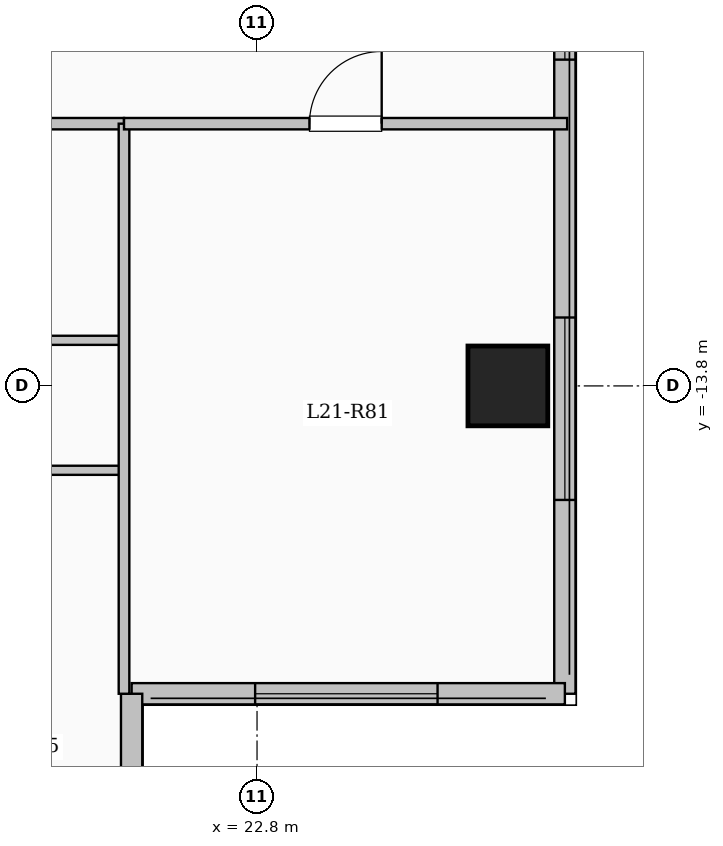
"""IFC4 building model, lengths in metres.
Left out: names, types, materials, properties, quantities, classifications, styles, units other than length and angle.
Written with IfcOpenShell. Run it as: python <this file> out.ifc"""

import sys

from ifc_helpers import new_model, si_unit, direction, frame, frame_2d, origin, origin_2d, place, context, subcontext, project, spatial, rectangle, extrude, element, fill, save


model = new_model("IFC4")
c1 = context("Model", 3, precision=1e-05, world=origin(), true_north=direction((0.0, 1.0)))
c2 = subcontext(c1, "Body", "Model", "MODEL_VIEW")
j1 = project(units=[si_unit("LENGTHUNIT", "METRE"), si_unit("PLANEANGLEUNIT", "RADIAN")], contexts=[c1])
p1 = place(None, origin())
s1 = spatial("IfcSite", under=j1, at=p1, CompositionType="ELEMENT")
p2 = place(p1, origin())
s2 = spatial("IfcBuilding", under=s1, at=p2, CompositionType="ELEMENT")
p3 = place(p2, frame((0.0, 0.0, 81.65)))
s3 = spatial("IfcBuildingStorey", under=s2, at=p3, CompositionType="ELEMENT", Elevation=81.65)
p4 = place(p3, frame((26.1, -13.8, 0.0), z_axis=(0.0, 0.0, 1.0), x_axis=(1.0, 0.0, 0.0)))
e1 = element("IfcColumn", 1, at=p4, inside=s3, PredefinedType="COLUMN", context=c2, shape_type="SweptSolid", body=[
    extrude(rectangle(XDim=1.05, YDim=1.05, at=origin_2d()), origin(), (0.0, 0.0, 1.0), 3.35),
])
p5 = place(p3, frame((26.85, 17.85, 0.0), z_axis=(0.0, 0.0, 1.0), x_axis=(0.0, -1.0, 0.0)))
e2 = element("IfcWall", 2, at=p5, inside=s3, PredefinedType="SOLIDWALL", context=c2, shape_type="SweptSolid", body=[
    extrude(rectangle(XDim=35.7, YDim=0.28, at=frame_2d((17.85, 0.0))), origin(), (0.0, 0.0, 1.0), 3.1),
])
p6 = place(p5, frame((1.675, 0.0, 0.9)))
e3 = element("IfcOpeningElement", 3, at=p6, cuts=e2, PredefinedType="OPENING", context=c2, shape_type="SweptSolid", body=[
    extrude(rectangle(XDim=2.0, YDim=1.7, at=frame_2d((1.0, 0.85))), frame((0.0, 0.15, 0.0), z_axis=(0.0, -1.0, 0.0), x_axis=(1.0, 0.0, 0.0)), (0.0, 0.0, 1.0), 0.3),
])
p7 = place(p5, frame((5.725, 0.0, 0.95)))
e4 = element("IfcOpeningElement", 4, at=p7, cuts=e2, PredefinedType="OPENING", context=c2, shape_type="SweptSolid", body=[
    extrude(rectangle(XDim=1.0, YDim=1.5, at=frame_2d((0.5, 0.75))), frame((0.0, 0.15, 0.0), z_axis=(0.0, -1.0, 0.0), x_axis=(1.0, 0.0, 0.0)), (0.0, 0.0, 1.0), 0.3),
])
p8 = place(p5, frame((8.975, 0.0, 0.9)))
e5 = element("IfcOpeningElement", 5, at=p8, cuts=e2, PredefinedType="OPENING", context=c2, shape_type="SweptSolid", body=[
    extrude(rectangle(XDim=2.0, YDim=1.7, at=frame_2d((1.0, 0.85))), frame((0.0, 0.15, 0.0), z_axis=(0.0, -1.0, 0.0), x_axis=(1.0, 0.0, 0.0)), (0.0, 0.0, 1.0), 0.3),
])
p9 = place(p5, frame((13.725, 0.0, 0.9)))
e6 = element("IfcOpeningElement", 6, at=p9, cuts=e2, PredefinedType="OPENING", context=c2, shape_type="SweptSolid", body=[
    extrude(rectangle(XDim=1.8, YDim=1.65, at=frame_2d((0.9, 0.825))), frame((0.0, 0.15, 0.0), z_axis=(0.0, -1.0, 0.0), x_axis=(1.0, 0.0, 0.0)), (0.0, 0.0, 1.0), 0.3),
])
p10 = place(p5, frame((19.55, 0.0, 0.9)))
e7 = element("IfcOpeningElement", 7, at=p10, cuts=e2, PredefinedType="OPENING", context=c2, shape_type="SweptSolid", body=[
    extrude(rectangle(XDim=2.4, YDim=1.8, at=frame_2d((1.2, 0.9))), frame((0.0, 0.15, 0.0), z_axis=(0.0, -1.0, 0.0), x_axis=(1.0, 0.0, 0.0)), (0.0, 0.0, 1.0), 0.3),
])
p11 = place(p5, frame((25.857, 0.0, 0.9)))
e8 = element("IfcOpeningElement", 8, at=p11, cuts=e2, PredefinedType="OPENING", context=c2, shape_type="SweptSolid", body=[
    extrude(rectangle(XDim=1.5, YDim=1.65, at=frame_2d((0.75, 0.825))), frame((0.0, 0.15, 0.0), z_axis=(0.0, -1.0, 0.0), x_axis=(1.0, 0.0, 0.0)), (0.0, 0.0, 1.0), 0.3),
])
p12 = place(p5, frame((30.75, 0.0, 0.9)))
e9 = element("IfcOpeningElement", 9, at=p12, cuts=e2, PredefinedType="OPENING", context=c2, shape_type="SweptSolid", body=[
    extrude(rectangle(XDim=2.4, YDim=1.8, at=frame_2d((1.2, 0.9))), frame((0.0, 0.15, 0.0), z_axis=(0.0, -1.0, 0.0), x_axis=(1.0, 0.0, 0.0)), (0.0, 0.0, 1.0), 0.3),
])
p13 = place(p3, frame((26.85, -17.85, 0.0), z_axis=(0.0, 0.0, 1.0), x_axis=(-1.0, 0.0, 0.0)))
e10 = element("IfcWall", 10, at=p13, inside=s3, PredefinedType="SOLIDWALL", context=c2, shape_type="SweptSolid", body=[
    extrude(rectangle(XDim=5.7, YDim=0.28, at=frame_2d((2.85, 0.0))), origin(), (0.0, 0.0, 1.0), 3.1),
])
p14 = place(p13, frame((1.675, 0.0, 0.9)))
e11 = element("IfcOpeningElement", 11, at=p14, cuts=e10, PredefinedType="OPENING", context=c2, shape_type="SweptSolid", body=[
    extrude(rectangle(XDim=2.4, YDim=1.8, at=frame_2d((1.2, 0.9))), frame((0.0, 0.15, 0.0), z_axis=(0.0, -1.0, 0.0), x_axis=(1.0, 0.0, 0.0)), (0.0, 0.0, 1.0), 0.3),
])
p15 = place(p3, frame((21.15, -17.85, 0.0), z_axis=(0.0, 0.0, 1.0), x_axis=(0.0, -1.0, 0.0)))
e12 = element("IfcWall", 12, at=p15, inside=s3, PredefinedType="SOLIDWALL", context=c2, shape_type="SweptSolid", body=[
    extrude(rectangle(XDim=4.2, YDim=0.28, at=frame_2d((2.1, 0.0))), origin(), (0.0, 0.0, 1.0), 3.1),
])
p16 = place(p15, frame((1.182, 0.0, 0.9)))
e13 = element("IfcOpeningElement", 13, at=p16, cuts=e12, PredefinedType="OPENING", context=c2, shape_type="SweptSolid", body=[
    extrude(rectangle(XDim=1.8, YDim=1.65, at=frame_2d((0.9, 0.825))), frame((0.0, 0.15, 0.0), z_axis=(0.0, -1.0, 0.0), x_axis=(1.0, 0.0, 0.0)), (0.0, 0.0, 1.0), 0.3),
])
p17 = place(p3, frame((8.55, -10.35, 0.0), z_axis=(0.0, 0.0, 1.0), x_axis=(1.0, 0.0, 0.0)))
e14 = element("IfcWall", 14, at=p17, inside=s3, PredefinedType="PARTITIONING", context=c2, shape_type="SweptSolid", body=[
    extrude(rectangle(XDim=12.5, YDim=0.15, at=frame_2d((6.25, 0.0))), origin(), (0.0, 0.0, 1.0), 3.1),
])
p18 = place(p17, frame((0.75, 0.0, 0.0)))
e15 = element("IfcOpeningElement", 15, at=p18, cuts=e14, PredefinedType="OPENING", context=c2, shape_type="SweptSolid", body=[
    extrude(rectangle(XDim=0.96, YDim=2.15, at=frame_2d((0.48, 1.075))), frame((0.0, 0.085, 0.0), z_axis=(0.0, -1.0, 0.0), x_axis=(1.0, 0.0, 0.0)), (0.0, 0.0, 1.0), 0.17),
])
p19 = place(p3, frame((17.165, -13.2, 0.0), z_axis=(0.0, 0.0, 1.0), x_axis=(1.0, 0.0, 0.0)))
e16 = element("IfcWall", 16, at=p19, inside=s3, PredefinedType="PARTITIONING", context=c2, shape_type="SweptSolid", body=[
    extrude(rectangle(XDim=3.885, YDim=0.12, at=frame_2d((1.942, 0.0))), origin(), (0.0, 0.0, 1.0), 3.1),
])
p20 = place(p19, frame((1.503, 0.0, 0.0)))
e17 = element("IfcOpeningElement", 17, at=p20, cuts=e16, PredefinedType="OPENING", context=c2, shape_type="SweptSolid", body=[
    extrude(rectangle(XDim=0.88, YDim=2.1, at=frame_2d((0.44, 1.05))), frame((0.0, 0.07, 0.0), z_axis=(0.0, -1.0, 0.0), x_axis=(1.0, 0.0, 0.0)), (0.0, 0.0, 1.0), 0.14),
])
p21 = place(p3, frame((12.792, -14.91, 0.0), z_axis=(0.0, 0.0, 1.0), x_axis=(1.0, 0.0, 0.0)))
e18 = element("IfcWall", 18, at=p21, inside=s3, PredefinedType="PARTITIONING", context=c2, shape_type="SweptSolid", body=[
    extrude(rectangle(XDim=8.318, YDim=0.12, at=frame_2d((4.159, 0.0))), origin(), (0.0, 0.0, 1.0), 3.1),
])
p22 = place(p21, frame((0.916, 0.0, 0.0)))
e19 = element("IfcOpeningElement", 19, at=p22, cuts=e18, PredefinedType="OPENING", context=c2, shape_type="SweptSolid", body=[
    extrude(rectangle(XDim=0.88, YDim=2.1, at=frame_2d((0.44, 1.05))), frame((0.0, 0.07, 0.0), z_axis=(0.0, -1.0, 0.0), x_axis=(1.0, 0.0, 0.0)), (0.0, 0.0, 1.0), 0.14),
])
p23 = place(p21, frame((3.629, 0.0, 0.0)))
e20 = element("IfcOpeningElement", 20, at=p23, cuts=e18, PredefinedType="OPENING", context=c2, shape_type="SweptSolid", body=[
    extrude(rectangle(XDim=0.88, YDim=2.1, at=frame_2d((0.44, 1.05))), frame((0.0, 0.07, 0.0), z_axis=(0.0, -1.0, 0.0), x_axis=(1.0, 0.0, 0.0)), (0.0, 0.0, 1.0), 0.14),
])
p24 = place(p21, frame((6.342, 0.0, 0.0)))
e21 = element("IfcOpeningElement", 21, at=p24, cuts=e18, PredefinedType="OPENING", context=c2, shape_type="SweptSolid", body=[
    extrude(rectangle(XDim=0.88, YDim=2.1, at=frame_2d((0.44, 1.05))), frame((0.0, 0.07, 0.0), z_axis=(0.0, -1.0, 0.0), x_axis=(1.0, 0.0, 0.0)), (0.0, 0.0, 1.0), 0.14),
])
p25 = place(p3, frame((21.05, -17.85, 0.0), z_axis=(0.0, 0.0, 1.0), x_axis=(0.0, 1.0, 0.0)))
e22 = element("IfcWall", 22, at=p25, inside=s3, PredefinedType="PARTITIONING", context=c2, shape_type="SweptSolid", body=[
    extrude(rectangle(XDim=7.5, YDim=0.14, at=frame_2d((3.75, 0.0))), origin(), (0.0, 0.0, 1.0), 3.1),
])
p26 = place(p3, frame((21.05, -10.35, 0.0), z_axis=(0.0, 0.0, 1.0), x_axis=(1.0, 0.0, 0.0)))
e23 = element("IfcWall", 23, at=p26, inside=s3, PredefinedType="PARTITIONING", context=c2, shape_type="SweptSolid", body=[
    extrude(rectangle(XDim=5.83, YDim=0.15, at=frame_2d((2.915, 0.0))), origin(), (0.0, 0.0, 1.0), 3.1),
])
p27 = place(p26, frame((2.44, 0.0, 0.0)))
e24 = element("IfcOpeningElement", 24, at=p27, cuts=e23, PredefinedType="OPENING", context=c2, shape_type="SweptSolid", body=[
    extrude(rectangle(XDim=0.95, YDim=2.15, at=frame_2d((0.475, 1.075))), frame((0.0, 0.085, 0.0), z_axis=(0.0, -1.0, 0.0), x_axis=(1.0, 0.0, 0.0)), (0.0, 0.0, 1.0), 0.17),
])
p28 = place(p11, origin())
e25 = element("IfcWindow", 25, at=p28, inside=s3, PartitioningType="SINGLE_PANEL", PredefinedType="WINDOW", context=c2, shape_type="SweptSolid", body=[
    extrude(rectangle(XDim=1.5, YDim=1.65, at=frame_2d((0.75, 0.825))), frame((0.0, 0.03, 0.0), z_axis=(0.0, -1.0, 0.0), x_axis=(1.0, 0.0, 0.0)), (0.0, 0.0, 1.0), 0.06),
])
fill(e8, e25)
p29 = place(p12, origin())
e26 = element("IfcWindow", 26, at=p29, inside=s3, PartitioningType="SINGLE_PANEL", PredefinedType="WINDOW", context=c2, shape_type="SweptSolid", body=[
    extrude(rectangle(XDim=2.4, YDim=1.8, at=frame_2d((1.2, 0.9))), frame((0.0, 0.03, 0.0), z_axis=(0.0, -1.0, 0.0), x_axis=(1.0, 0.0, 0.0)), (0.0, 0.0, 1.0), 0.06),
])
fill(e9, e26)
p30 = place(p14, origin())
e27 = element("IfcWindow", 27, at=p30, inside=s3, PartitioningType="SINGLE_PANEL", PredefinedType="WINDOW", context=c2, shape_type="SweptSolid", body=[
    extrude(rectangle(XDim=2.4, YDim=1.8, at=frame_2d((1.2, 0.9))), frame((0.0, 0.03, 0.0), z_axis=(0.0, -1.0, 0.0), x_axis=(1.0, 0.0, 0.0)), (0.0, 0.0, 1.0), 0.06),
])
fill(e11, e27)
p31 = place(p27, origin())
e28 = element("IfcDoor", 28, at=p31, inside=s3, OperationType="SINGLE_SWING_RIGHT", PredefinedType="DOOR", context=c2, shape_type="SweptSolid", body=[
    extrude(rectangle(XDim=0.95, YDim=2.15, at=frame_2d((0.475, 1.075))), frame((0.0, 0.025, 0.0), z_axis=(0.0, -1.0, 0.0), x_axis=(1.0, 0.0, 0.0)), (0.0, 0.0, 1.0), 0.05),
])
fill(e24, e28)
save(model, sys.argv[1])
